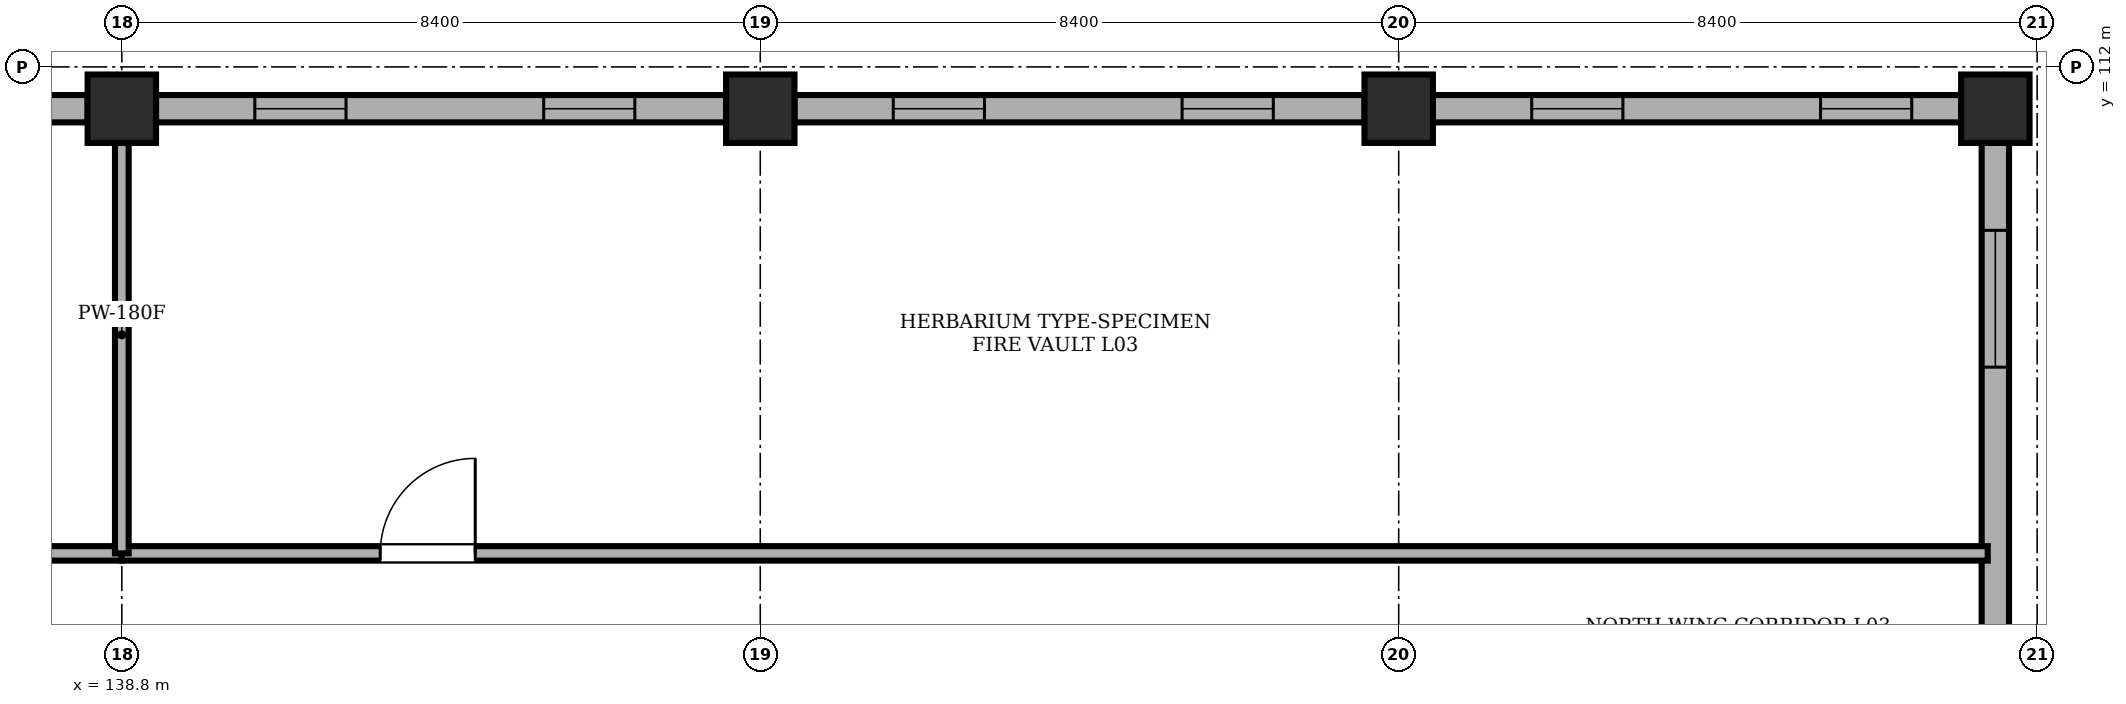
"""IFC4 building model, lengths in metres.
Left out: names, types, materials, properties, quantities, classifications, styles, units other than length and angle.
Written with IfcOpenShell. Run it as: python <this file> out.ifc"""

import sys

from ifc_helpers import new_model, si_unit, direction, frame, frame_2d, origin, origin_2d, place, context, subcontext, project, spatial, rectangle, extrude, element, fill, save


model = new_model("IFC4")
c1 = context("Model", 3, precision=1e-05, world=origin(), true_north=direction((0.0, 1.0)))
c2 = subcontext(c1, "Body", "Model", "MODEL_VIEW")
j1 = project(units=[si_unit("LENGTHUNIT", "METRE"), si_unit("PLANEANGLEUNIT", "RADIAN")], contexts=[c1])
p1 = place(None, origin())
s1 = spatial("IfcSite", under=j1, at=p1, CompositionType="ELEMENT")
p2 = place(p1, origin())
s2 = spatial("IfcBuilding", under=s1, at=p2, CompositionType="ELEMENT")
p3 = place(p2, frame((0.0, 0.0, 10.2)))
s3 = spatial("IfcBuildingStorey", under=s2, at=p3, CompositionType="ELEMENT", Elevation=10.2)
for number, where, z_axis, x_axis in (
    (1, (138.8, 111.45, 0.0), (0.0, 0.0, 1.0), (1.0, 0.0, 0.0)),
    (2, (147.2, 111.45, 0.0), (0.0, 0.0, 1.0), (1.0, 0.0, 0.0)),
    (3, (155.6, 111.45, 0.0), (0.0, 0.0, 1.0), (1.0, 0.0, 0.0)),
    (4, (163.45, 111.45, 0.0), (0.0, 0.0, 1.0), (1.0, 0.0, 0.0)),
):
    element("IfcColumn", number, at=place(p3, frame(where, z_axis=z_axis, x_axis=x_axis)), inside=s3, PredefinedType="COLUMN", context=c2, shape_type="SweptSolid", body=[
        extrude(rectangle(XDim=0.9, YDim=0.9, at=origin_2d()), origin(), (0.0, 0.0, 1.0), 4.26),
    ])
p4 = place(p3, frame((130.85, 111.45, 0.0), z_axis=(0.0, 0.0, 1.0), x_axis=(1.0, 0.0, 0.0)))
e5 = element("IfcWall", 5, at=p4, inside=s3, PredefinedType="STANDARD", context=c2, shape_type="SweptSolid", body=[
    extrude(rectangle(XDim=7.5, YDim=0.36, at=frame_2d((3.75, 0.0))), origin(), (0.0, 0.0, 1.0), 3.51),
])
p5 = place(p4, frame((1.3, 0.0, 1.1)))
e6 = element("IfcOpeningElement", 6, at=p5, cuts=e5, PredefinedType="OPENING", context=c2, shape_type="SweptSolid", body=[
    extrude(rectangle(XDim=1.2, YDim=1.8, at=frame_2d((0.6, 0.9))), frame((0.0, 0.19, 0.0), z_axis=(0.0, -1.0, 0.0), x_axis=(1.0, 0.0, 0.0)), (0.0, 0.0, 1.0), 0.38),
])
p6 = place(p4, frame((5.1, 0.0, 1.1)))
e7 = element("IfcOpeningElement", 7, at=p6, cuts=e5, PredefinedType="OPENING", context=c2, shape_type="SweptSolid", body=[
    extrude(rectangle(XDim=1.2, YDim=1.8, at=frame_2d((0.6, 0.9))), frame((0.0, 0.19, 0.0), z_axis=(0.0, -1.0, 0.0), x_axis=(1.0, 0.0, 0.0)), (0.0, 0.0, 1.0), 0.38),
])
p7 = place(p3, frame((139.25, 111.45, 0.0), z_axis=(0.0, 0.0, 1.0), x_axis=(1.0, 0.0, 0.0)))
e8 = element("IfcWall", 8, at=p7, inside=s3, PredefinedType="STANDARD", context=c2, shape_type="SweptSolid", body=[
    extrude(rectangle(XDim=7.5, YDim=0.36, at=frame_2d((3.75, 0.0))), origin(), (0.0, 0.0, 1.0), 3.51),
])
p8 = place(p7, frame((1.3, 0.0, 1.1)))
e9 = element("IfcOpeningElement", 9, at=p8, cuts=e8, PredefinedType="OPENING", context=c2, shape_type="SweptSolid", body=[
    extrude(rectangle(XDim=1.2, YDim=1.8, at=frame_2d((0.6, 0.9))), frame((0.0, 0.19, 0.0), z_axis=(0.0, -1.0, 0.0), x_axis=(1.0, 0.0, 0.0)), (0.0, 0.0, 1.0), 0.38),
])
p9 = place(p7, frame((5.1, 0.0, 1.1)))
e10 = element("IfcOpeningElement", 10, at=p9, cuts=e8, PredefinedType="OPENING", context=c2, shape_type="SweptSolid", body=[
    extrude(rectangle(XDim=1.2, YDim=1.8, at=frame_2d((0.6, 0.9))), frame((0.0, 0.19, 0.0), z_axis=(0.0, -1.0, 0.0), x_axis=(1.0, 0.0, 0.0)), (0.0, 0.0, 1.0), 0.38),
])
p10 = place(p3, frame((147.65, 111.45, 0.0), z_axis=(0.0, 0.0, 1.0), x_axis=(1.0, 0.0, 0.0)))
e11 = element("IfcWall", 11, at=p10, inside=s3, PredefinedType="STANDARD", context=c2, shape_type="SweptSolid", body=[
    extrude(rectangle(XDim=7.5, YDim=0.36, at=frame_2d((3.75, 0.0))), origin(), (0.0, 0.0, 1.0), 3.51),
])
p11 = place(p10, frame((1.3, 0.0, 1.1)))
e12 = element("IfcOpeningElement", 12, at=p11, cuts=e11, PredefinedType="OPENING", context=c2, shape_type="SweptSolid", body=[
    extrude(rectangle(XDim=1.2, YDim=1.8, at=frame_2d((0.6, 0.9))), frame((0.0, 0.19, 0.0), z_axis=(0.0, -1.0, 0.0), x_axis=(1.0, 0.0, 0.0)), (0.0, 0.0, 1.0), 0.38),
])
p12 = place(p10, frame((5.1, 0.0, 1.1)))
e13 = element("IfcOpeningElement", 13, at=p12, cuts=e11, PredefinedType="OPENING", context=c2, shape_type="SweptSolid", body=[
    extrude(rectangle(XDim=1.2, YDim=1.8, at=frame_2d((0.6, 0.9))), frame((0.0, 0.19, 0.0), z_axis=(0.0, -1.0, 0.0), x_axis=(1.0, 0.0, 0.0)), (0.0, 0.0, 1.0), 0.38),
])
p13 = place(p3, frame((156.05, 111.45, 0.0), z_axis=(0.0, 0.0, 1.0), x_axis=(1.0, 0.0, 0.0)))
e14 = element("IfcWall", 14, at=p13, inside=s3, PredefinedType="STANDARD", context=c2, shape_type="SweptSolid", body=[
    extrude(rectangle(XDim=6.95, YDim=0.36, at=frame_2d((3.475, 0.0))), origin(), (0.0, 0.0, 1.0), 3.51),
])
p14 = place(p13, frame((1.3, 0.0, 1.1)))
e15 = element("IfcOpeningElement", 15, at=p14, cuts=e14, PredefinedType="OPENING", context=c2, shape_type="SweptSolid", body=[
    extrude(rectangle(XDim=1.2, YDim=1.8, at=frame_2d((0.6, 0.9))), frame((0.0, 0.19, 0.0), z_axis=(0.0, -1.0, 0.0), x_axis=(1.0, 0.0, 0.0)), (0.0, 0.0, 1.0), 0.38),
])
p15 = place(p13, frame((5.1, 0.0, 1.1)))
e16 = element("IfcOpeningElement", 16, at=p15, cuts=e14, PredefinedType="OPENING", context=c2, shape_type="SweptSolid", body=[
    extrude(rectangle(XDim=1.2, YDim=1.8, at=frame_2d((0.6, 0.9))), frame((0.0, 0.19, 0.0), z_axis=(0.0, -1.0, 0.0), x_axis=(1.0, 0.0, 0.0)), (0.0, 0.0, 1.0), 0.38),
])
p16 = place(p3, frame((163.45, 111.0, 0.0), z_axis=(0.0, 0.0, 1.0), x_axis=(0.0, -1.0, 0.0)))
e17 = element("IfcWall", 17, at=p16, inside=s3, PredefinedType="STANDARD", context=c2, shape_type="SweptSolid", body=[
    extrude(rectangle(XDim=6.95, YDim=0.36, at=frame_2d((3.475, 0.0))), origin(), (0.0, 0.0, 1.0), 3.51),
])
p17 = place(p16, frame((1.15, 0.0, 1.1)))
e18 = element("IfcOpeningElement", 18, at=p17, cuts=e17, PredefinedType="OPENING", context=c2, shape_type="SweptSolid", body=[
    extrude(rectangle(XDim=1.8, YDim=1.8, at=frame_2d((0.9, 0.9))), frame((0.0, 0.19, 0.0), z_axis=(0.0, -1.0, 0.0), x_axis=(1.0, 0.0, 0.0)), (0.0, 0.0, 1.0), 0.38),
])
p18 = place(p3, frame((122.15, 105.6, 0.0), z_axis=(0.0, 0.0, 1.0), x_axis=(1.0, 0.0, 0.0)))
e19 = element("IfcWall", 19, at=p18, inside=s3, PredefinedType="SOLIDWALL", context=c2, shape_type="SweptSolid", body=[
    extrude(rectangle(XDim=16.65, YDim=0.19, at=frame_2d((8.325, 0.0))), origin(), (0.0, 0.0, 1.0), 4.26),
])
p19 = place(p18, frame((3.75, 0.0, 0.0)))
e20 = element("IfcOpeningElement", 20, at=p19, cuts=e19, PredefinedType="OPENING", context=c2, shape_type="SweptSolid", body=[
    extrude(rectangle(XDim=1.25, YDim=2.2, at=frame_2d((0.625, 1.1))), frame((0.0, 0.105, 0.0), z_axis=(0.0, -1.0, 0.0), x_axis=(1.0, 0.0, 0.0)), (0.0, 0.0, 1.0), 0.21),
])
p20 = place(p3, frame((138.8, 105.6, 0.0), z_axis=(0.0, 0.0, 1.0), x_axis=(1.0, 0.0, 0.0)))
e21 = element("IfcWall", 21, at=p20, inside=s3, PredefinedType="SOLIDWALL", context=c2, shape_type="SweptSolid", body=[
    extrude(rectangle(XDim=24.55, YDim=0.19, at=frame_2d((12.275, 0.0))), origin(), (0.0, 0.0, 1.0), 4.26),
])
p21 = place(p20, frame((3.4, 0.0, 0.0)))
e22 = element("IfcOpeningElement", 22, at=p21, cuts=e21, PredefinedType="OPENING", context=c2, shape_type="SweptSolid", body=[
    extrude(rectangle(XDim=1.25, YDim=2.2, at=frame_2d((0.625, 1.1))), frame((0.0, 0.105, 0.0), z_axis=(0.0, -1.0, 0.0), x_axis=(1.0, 0.0, 0.0)), (0.0, 0.0, 1.0), 0.21),
])
p22 = place(p3, frame((138.8, 105.6, 0.0), z_axis=(0.0, 0.0, 1.0), x_axis=(0.0, 1.0, 0.0)))
e23 = element("IfcWall", 23, at=p22, inside=s3, PredefinedType="STANDARD", context=c2, shape_type="SweptSolid", body=[
    extrude(rectangle(XDim=5.75, YDim=0.18, at=frame_2d((2.875, 0.0))), origin(), (0.0, 0.0, 1.0), 3.51),
])
p23 = place(p8, origin())
e24 = element("IfcWindow", 24, at=p23, inside=s3, PartitioningType="SINGLE_PANEL", PredefinedType="WINDOW", context=c2, shape_type="SweptSolid", body=[
    extrude(rectangle(XDim=1.2, YDim=1.8, at=frame_2d((0.6, 0.9))), frame((0.0, 0.03, 0.0), z_axis=(0.0, -1.0, 0.0), x_axis=(1.0, 0.0, 0.0)), (0.0, 0.0, 1.0), 0.06),
])
fill(e9, e24)
p24 = place(p9, origin())
e25 = element("IfcWindow", 25, at=p24, inside=s3, PartitioningType="SINGLE_PANEL", PredefinedType="WINDOW", context=c2, shape_type="SweptSolid", body=[
    extrude(rectangle(XDim=1.2, YDim=1.8, at=frame_2d((0.6, 0.9))), frame((0.0, 0.03, 0.0), z_axis=(0.0, -1.0, 0.0), x_axis=(1.0, 0.0, 0.0)), (0.0, 0.0, 1.0), 0.06),
])
fill(e10, e25)
p25 = place(p11, origin())
e26 = element("IfcWindow", 26, at=p25, inside=s3, PartitioningType="SINGLE_PANEL", PredefinedType="WINDOW", context=c2, shape_type="SweptSolid", body=[
    extrude(rectangle(XDim=1.2, YDim=1.8, at=frame_2d((0.6, 0.9))), frame((0.0, 0.03, 0.0), z_axis=(0.0, -1.0, 0.0), x_axis=(1.0, 0.0, 0.0)), (0.0, 0.0, 1.0), 0.06),
])
fill(e12, e26)
p26 = place(p12, origin())
e27 = element("IfcWindow", 27, at=p26, inside=s3, PartitioningType="SINGLE_PANEL", PredefinedType="WINDOW", context=c2, shape_type="SweptSolid", body=[
    extrude(rectangle(XDim=1.2, YDim=1.8, at=frame_2d((0.6, 0.9))), frame((0.0, 0.03, 0.0), z_axis=(0.0, -1.0, 0.0), x_axis=(1.0, 0.0, 0.0)), (0.0, 0.0, 1.0), 0.06),
])
fill(e13, e27)
p27 = place(p14, origin())
e28 = element("IfcWindow", 28, at=p27, inside=s3, PartitioningType="SINGLE_PANEL", PredefinedType="WINDOW", context=c2, shape_type="SweptSolid", body=[
    extrude(rectangle(XDim=1.2, YDim=1.8, at=frame_2d((0.6, 0.9))), frame((0.0, 0.03, 0.0), z_axis=(0.0, -1.0, 0.0), x_axis=(1.0, 0.0, 0.0)), (0.0, 0.0, 1.0), 0.06),
])
fill(e15, e28)
p28 = place(p15, origin())
e29 = element("IfcWindow", 29, at=p28, inside=s3, PartitioningType="SINGLE_PANEL", PredefinedType="WINDOW", context=c2, shape_type="SweptSolid", body=[
    extrude(rectangle(XDim=1.2, YDim=1.8, at=frame_2d((0.6, 0.9))), frame((0.0, 0.03, 0.0), z_axis=(0.0, -1.0, 0.0), x_axis=(1.0, 0.0, 0.0)), (0.0, 0.0, 1.0), 0.06),
])
fill(e16, e29)
p29 = place(p17, origin())
e30 = element("IfcWindow", 30, at=p29, inside=s3, PartitioningType="DOUBLE_PANEL_VERTICAL", PredefinedType="WINDOW", context=c2, shape_type="SweptSolid", body=[
    extrude(rectangle(XDim=1.8, YDim=1.8, at=frame_2d((0.9, 0.9))), frame((0.0, 0.03, 0.0), z_axis=(0.0, -1.0, 0.0), x_axis=(1.0, 0.0, 0.0)), (0.0, 0.0, 1.0), 0.06),
])
fill(e18, e30)
p30 = place(p21, origin())
e31 = element("IfcDoor", 31, at=p30, inside=s3, OperationType="SINGLE_SWING_RIGHT", PredefinedType="DOOR", context=c2, shape_type="SweptSolid", body=[
    extrude(rectangle(XDim=1.25, YDim=2.2, at=frame_2d((0.625, 1.1))), frame((0.0, 0.025, 0.0), z_axis=(0.0, -1.0, 0.0), x_axis=(1.0, 0.0, 0.0)), (0.0, 0.0, 1.0), 0.05),
])
fill(e22, e31)
save(model, sys.argv[1])
